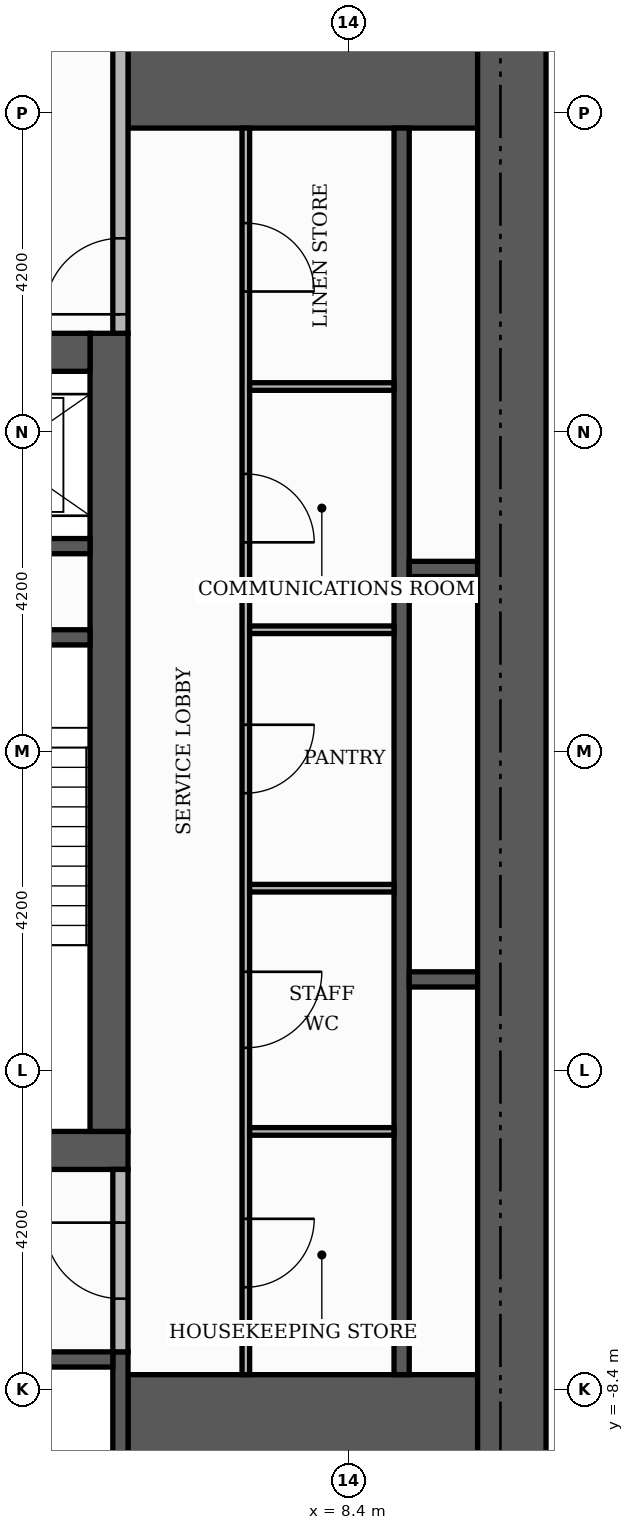
"""IFC4 building model, lengths in metres.
Left out: names, types, materials, properties, quantities, classifications, styles, units other than length and angle.
Written with IfcOpenShell. Run it as: python <this file> out.ifc"""

import sys

from ifc_helpers import new_model, si_unit, direction, frame, frame_2d, origin, place, context, subcontext, project, spatial, rectangle, extrude, element, fill, save


model = new_model("IFC4")
c1 = context("Model", 3, precision=1e-05, world=origin(), true_north=direction((0.0, 1.0)))
c2 = subcontext(c1, "Body", "Model", "MODEL_VIEW")
j1 = project(units=[si_unit("LENGTHUNIT", "METRE"), si_unit("PLANEANGLEUNIT", "RADIAN")], contexts=[c1])
p1 = place(None, origin())
s1 = spatial("IfcSite", under=j1, at=p1, CompositionType="ELEMENT")
p2 = place(p1, origin())
s2 = spatial("IfcBuilding", under=s1, at=p2, CompositionType="ELEMENT")
p3 = place(p2, frame((0.0, 0.0, 38.7)))
s3 = spatial("IfcBuildingStorey", under=s2, at=p3, CompositionType="ELEMENT", Elevation=38.7)
p4 = place(p3, frame((-5.5, -5.25, 0.0), z_axis=(0.0, 0.0, 1.0), x_axis=(1.0, 0.0, 0.0)))
e1 = element("IfcWall", 1, at=p4, inside=s3, PredefinedType="SHEAR", context=c2, shape_type="SweptSolid", body=[
    extrude(rectangle(XDim=11.0, YDim=0.5, at=frame_2d((5.5, 0.0))), origin(), (0.0, 0.0, 1.0), 3.48),
])
p5 = place(p4, frame((4.9, 0.0, 0.0)))
e2 = element("IfcOpeningElement", 2, at=p5, cuts=e1, PredefinedType="OPENING", context=c2, shape_type="SweptSolid", body=[
    extrude(rectangle(XDim=1.2, YDim=2.1, at=frame_2d((0.6, 1.05))), frame((0.0, 0.26, 0.0), z_axis=(0.0, -1.0, 0.0), x_axis=(1.0, 0.0, 0.0)), (0.0, 0.0, 1.0), 0.52),
])
p6 = place(p3, frame((5.25, -5.0, 0.0), z_axis=(0.0, 0.0, 1.0), x_axis=(0.0, 1.0, 0.0)))
e3 = element("IfcWall", 3, at=p6, inside=s3, PredefinedType="SHEAR", context=c2, shape_type="SweptSolid", body=[
    extrude(rectangle(XDim=10.5, YDim=0.5, at=frame_2d((5.25, 0.0))), origin(), (0.0, 0.0, 1.0), 3.48),
])
p7 = place(p3, frame((-5.0, 5.25, 0.0), z_axis=(0.0, 0.0, 1.0), x_axis=(1.0, 0.0, 0.0)))
e4 = element("IfcWall", 4, at=p7, inside=s3, PredefinedType="SHEAR", context=c2, shape_type="SweptSolid", body=[
    extrude(rectangle(XDim=10.0, YDim=0.5, at=frame_2d((5.0, 0.0))), origin(), (0.0, 0.0, 1.0), 3.48),
])
p8 = place(p7, frame((4.4, 0.0, 0.0)))
e5 = element("IfcOpeningElement", 5, at=p8, cuts=e4, PredefinedType="OPENING", context=c2, shape_type="SweptSolid", body=[
    extrude(rectangle(XDim=1.2, YDim=2.1, at=frame_2d((0.6, 1.05))), frame((0.0, 0.26, 0.0), z_axis=(0.0, -1.0, 0.0), x_axis=(1.0, 0.0, 0.0)), (0.0, 0.0, 1.0), 0.52),
])
for number, where, z_axis, x_axis in (
    (6, (5.5, -9.15, 0.0), (0.0, 0.0, 1.0), (1.0, 0.0, 0.0)),
    (7, (5.5, 9.15, 0.0), (0.0, 0.0, 1.0), (1.0, 0.0, 0.0)),
):
    element("IfcWall", number, at=place(p3, frame(where, z_axis=z_axis, x_axis=x_axis)), inside=s3, PredefinedType="SHEAR", context=c2, shape_type="SweptSolid", body=[
        extrude(rectangle(XDim=4.6, YDim=1.9, at=frame_2d((2.3, 0.0))), origin(), (0.0, 0.0, 1.0), 3.48),
    ])
p9 = place(p3, frame((2.15, 1.5, 0.0), z_axis=(0.0, 0.0, 1.0), x_axis=(1.0, 0.0, 0.0)))
e8 = element("IfcWall", 8, at=p9, inside=s3, PredefinedType="SHEAR", context=c2, shape_type="SweptSolid", body=[
    extrude(rectangle(XDim=2.85, YDim=0.2, at=frame_2d((1.425, 0.0))), origin(), (0.0, 0.0, 1.0), 3.48),
])
p10 = place(p3, frame((5.4, -10.1, 0.0), z_axis=(0.0, 0.0, 1.0), x_axis=(0.0, 1.0, 0.0)))
e9 = element("IfcWall", 9, at=p10, inside=s3, PredefinedType="SHEAR", context=c2, shape_type="SweptSolid", body=[
    extrude(rectangle(XDim=2.2, YDim=0.2, at=frame_2d((1.1, 0.0))), origin(), (0.0, 0.0, 1.0), 3.48),
])
p11 = place(p3, frame((9.1, -8.2, 0.0), z_axis=(0.0, 0.0, 1.0), x_axis=(0.0, 1.0, 0.0)))
e10 = element("IfcWall", 10, at=p11, inside=s3, PredefinedType="SHEAR", context=c2, shape_type="SweptSolid", body=[
    extrude(rectangle(XDim=16.4, YDim=0.2, at=frame_2d((8.2, 0.0))), origin(), (0.0, 0.0, 1.0), 3.48),
])
p12 = place(p3, frame((2.8, -8.0, 0.0), z_axis=(0.0, 0.0, 1.0), x_axis=(1.0, 0.0, 0.0)))
e11 = element("IfcWall", 11, at=p12, inside=s3, PredefinedType="SHEAR", context=c2, shape_type="SweptSolid", body=[
    extrude(rectangle(XDim=2.5, YDim=0.2, at=frame_2d((1.25, 0.0))), origin(), (0.0, 0.0, 1.0), 3.48),
])
for number, where, z_axis, x_axis in (
    (12, (9.2, -3.0, 0.0), (0.0, 0.0, 1.0), (1.0, 0.0, 0.0)),
    (13, (9.2, 2.4, 0.0), (0.0, 0.0, 1.0), (1.0, 0.0, 0.0)),
):
    element("IfcWall", number, at=place(p3, frame(where, z_axis=z_axis, x_axis=x_axis)), inside=s3, PredefinedType="SHEAR", context=c2, shape_type="SweptSolid", body=[
        extrude(rectangle(XDim=0.9, YDim=0.2, at=frame_2d((0.45, 0.0))), origin(), (0.0, 0.0, 1.0), 3.48),
    ])
p13 = place(p3, frame((2.15, 2.7, 0.0), z_axis=(0.0, 0.0, 1.0), x_axis=(1.0, 0.0, 0.0)))
e14 = element("IfcWall", 14, at=p13, inside=s3, PredefinedType="SHEAR", context=c2, shape_type="SweptSolid", body=[
    extrude(rectangle(XDim=2.85, YDim=0.2, at=frame_2d((1.425, 0.0))), origin(), (0.0, 0.0, 1.0), 3.48),
])
p14 = place(p3, frame((10.55, -10.1, 0.0), z_axis=(0.0, 0.0, 1.0), x_axis=(0.0, 1.0, 0.0)))
e15 = element("IfcWall", 15, at=p14, inside=s3, PredefinedType="SHEAR", context=c2, shape_type="SweptSolid", body=[
    extrude(rectangle(XDim=20.2, YDim=0.9, at=frame_2d((10.1, 0.0))), origin(), (0.0, 0.0, 1.0), 3.48),
])
p15 = place(p3, frame((7.05, -8.2, 0.0), z_axis=(0.0, 0.0, 1.0), x_axis=(0.0, 1.0, 0.0)))
e16 = element("IfcWall", 16, at=p15, inside=s3, PredefinedType="PARTITIONING", context=c2, shape_type="SweptSolid", body=[
    extrude(rectangle(XDim=16.4, YDim=0.1, at=frame_2d((8.2, 0.0))), origin(), (0.0, 0.0, 1.0), 3.48),
])
p16 = place(p15, frame((1.15, 0.0, 0.0)))
e17 = element("IfcOpeningElement", 17, at=p16, cuts=e16, PredefinedType="OPENING", context=c2, shape_type="SweptSolid", body=[
    extrude(rectangle(XDim=0.9, YDim=2.1, at=frame_2d((0.45, 1.05))), frame((0.0, 0.06, 0.0), z_axis=(0.0, -1.0, 0.0), x_axis=(1.0, 0.0, 0.0)), (0.0, 0.0, 1.0), 0.12),
])
p17 = place(p15, frame((4.3, 0.0, 0.0)))
e18 = element("IfcOpeningElement", 18, at=p17, cuts=e16, PredefinedType="OPENING", context=c2, shape_type="SweptSolid", body=[
    extrude(rectangle(XDim=1.0, YDim=2.1, at=frame_2d((0.5, 1.05))), frame((0.0, 0.06, 0.0), z_axis=(0.0, -1.0, 0.0), x_axis=(1.0, 0.0, 0.0)), (0.0, 0.0, 1.0), 0.12),
])
p18 = place(p15, frame((7.65, 0.0, 0.0)))
e19 = element("IfcOpeningElement", 19, at=p18, cuts=e16, PredefinedType="OPENING", context=c2, shape_type="SweptSolid", body=[
    extrude(rectangle(XDim=0.9, YDim=2.1, at=frame_2d((0.45, 1.05))), frame((0.0, 0.06, 0.0), z_axis=(0.0, -1.0, 0.0), x_axis=(1.0, 0.0, 0.0)), (0.0, 0.0, 1.0), 0.12),
])
p19 = place(p15, frame((10.95, 0.0, 0.0)))
e20 = element("IfcOpeningElement", 20, at=p19, cuts=e16, PredefinedType="OPENING", context=c2, shape_type="SweptSolid", body=[
    extrude(rectangle(XDim=0.9, YDim=2.1, at=frame_2d((0.45, 1.05))), frame((0.0, 0.06, 0.0), z_axis=(0.0, -1.0, 0.0), x_axis=(1.0, 0.0, 0.0)), (0.0, 0.0, 1.0), 0.12),
])
p20 = place(p15, frame((14.25, 0.0, 0.0)))
e21 = element("IfcOpeningElement", 21, at=p20, cuts=e16, PredefinedType="OPENING", context=c2, shape_type="SweptSolid", body=[
    extrude(rectangle(XDim=0.9, YDim=2.1, at=frame_2d((0.45, 1.05))), frame((0.0, 0.06, 0.0), z_axis=(0.0, -1.0, 0.0), x_axis=(1.0, 0.0, 0.0)), (0.0, 0.0, 1.0), 0.12),
])
p21 = place(p3, frame((5.4, -7.9, 0.0), z_axis=(0.0, 0.0, 1.0), x_axis=(0.0, 1.0, 0.0)))
e22 = element("IfcWall", 22, at=p21, inside=s3, PredefinedType="PARTITIONING", context=c2, shape_type="SweptSolid", body=[
    extrude(rectangle(XDim=2.4, YDim=0.2, at=frame_2d((1.2, 0.0))), origin(), (0.0, 0.0, 1.0), 3.48),
])
p22 = place(p21, frame((0.7, 0.0, 0.0)))
e23 = element("IfcOpeningElement", 23, at=p22, cuts=e22, PredefinedType="OPENING", context=c2, shape_type="SweptSolid", body=[
    extrude(rectangle(XDim=1.0, YDim=2.1, at=frame_2d((0.5, 1.05))), frame((0.0, 0.11, 0.0), z_axis=(0.0, -1.0, 0.0), x_axis=(1.0, 0.0, 0.0)), (0.0, 0.0, 1.0), 0.22),
])
for number, where, z_axis, x_axis in (
    (24, (7.1, -5.0, 0.0), (0.0, 0.0, 1.0), (1.0, 0.0, 0.0)),
    (25, (7.1, -1.8, 0.0), (0.0, 0.0, 1.0), (1.0, 0.0, 0.0)),
    (26, (7.1, 1.6, 0.0), (0.0, 0.0, 1.0), (1.0, 0.0, 0.0)),
    (27, (7.1, 4.8, 0.0), (0.0, 0.0, 1.0), (1.0, 0.0, 0.0)),
):
    element("IfcWall", number, at=place(p3, frame(where, z_axis=z_axis, x_axis=x_axis)), inside=s3, PredefinedType="PARTITIONING", context=c2, shape_type="SweptSolid", body=[
        extrude(rectangle(XDim=1.9, YDim=0.1, at=frame_2d((0.95, 0.0))), origin(), (0.0, 0.0, 1.0), 3.48),
    ])
p23 = place(p3, frame((5.4, 5.5, 0.0), z_axis=(0.0, 0.0, 1.0), x_axis=(0.0, 1.0, 0.0)))
e28 = element("IfcWall", 28, at=p23, inside=s3, PredefinedType="PARTITIONING", context=c2, shape_type="SweptSolid", body=[
    extrude(rectangle(XDim=4.6, YDim=0.2, at=frame_2d((2.3, 0.0))), origin(), (0.0, 0.0, 1.0), 3.48),
])
p24 = place(p23, frame((0.25, 0.0, 0.0)))
e29 = element("IfcOpeningElement", 29, at=p24, cuts=e28, PredefinedType="OPENING", context=c2, shape_type="SweptSolid", body=[
    extrude(rectangle(XDim=1.0, YDim=2.1, at=frame_2d((0.5, 1.05))), frame((0.0, 0.11, 0.0), z_axis=(0.0, -1.0, 0.0), x_axis=(1.0, 0.0, 0.0)), (0.0, 0.0, 1.0), 0.22),
])
p25 = place(p24, origin())
e30 = element("IfcDoor", 30, at=p25, inside=s3, OperationType="SINGLE_SWING_LEFT", PredefinedType="DOOR", context=c2, shape_type="SweptSolid", body=[
    extrude(rectangle(XDim=1.0, YDim=2.1, at=frame_2d((0.5, 1.05))), frame((0.0, 0.025, 0.0), z_axis=(0.0, -1.0, 0.0), x_axis=(1.0, 0.0, 0.0)), (0.0, 0.0, 1.0), 0.05),
])
fill(e29, e30)
p26 = place(p22, origin())
e31 = element("IfcDoor", 31, at=p26, inside=s3, OperationType="SINGLE_SWING_RIGHT", PredefinedType="DOOR", context=c2, shape_type="SweptSolid", body=[
    extrude(rectangle(XDim=1.0, YDim=2.1, at=frame_2d((0.5, 1.05))), frame((0.0, 0.025, 0.0), z_axis=(0.0, -1.0, 0.0), x_axis=(1.0, 0.0, 0.0)), (0.0, 0.0, 1.0), 0.05),
])
fill(e23, e31)
p27 = place(p16, frame((0.9, 0.0, 0.0), z_axis=(0.0, 0.0, 1.0), x_axis=(-1.0, 0.0, 0.0)))
e32 = element("IfcDoor", 32, at=p27, inside=s3, OperationType="SINGLE_SWING_RIGHT", PredefinedType="DOOR", context=c2, shape_type="SweptSolid", body=[
    extrude(rectangle(XDim=0.9, YDim=2.1, at=frame_2d((0.45, 1.05))), frame((0.0, 0.025, 0.0), z_axis=(0.0, -1.0, 0.0), x_axis=(1.0, 0.0, 0.0)), (0.0, 0.0, 1.0), 0.05),
])
fill(e17, e32)
p28 = place(p17, frame((1.0, 0.0, 0.0), z_axis=(0.0, 0.0, 1.0), x_axis=(-1.0, 0.0, 0.0)))
e33 = element("IfcDoor", 33, at=p28, inside=s3, OperationType="SINGLE_SWING_RIGHT", PredefinedType="DOOR", context=c2, shape_type="SweptSolid", body=[
    extrude(rectangle(XDim=1.0, YDim=2.1, at=frame_2d((0.5, 1.05))), frame((0.0, 0.025, 0.0), z_axis=(0.0, -1.0, 0.0), x_axis=(1.0, 0.0, 0.0)), (0.0, 0.0, 1.0), 0.05),
])
fill(e18, e33)
p29 = place(p18, frame((0.9, 0.0, 0.0), z_axis=(0.0, 0.0, 1.0), x_axis=(-1.0, 0.0, 0.0)))
e34 = element("IfcDoor", 34, at=p29, inside=s3, OperationType="SINGLE_SWING_RIGHT", PredefinedType="DOOR", context=c2, shape_type="SweptSolid", body=[
    extrude(rectangle(XDim=0.9, YDim=2.1, at=frame_2d((0.45, 1.05))), frame((0.0, 0.025, 0.0), z_axis=(0.0, -1.0, 0.0), x_axis=(1.0, 0.0, 0.0)), (0.0, 0.0, 1.0), 0.05),
])
fill(e19, e34)
p30 = place(p19, frame((0.9, 0.0, 0.0), z_axis=(0.0, 0.0, 1.0), x_axis=(-1.0, 0.0, 0.0)))
e35 = element("IfcDoor", 35, at=p30, inside=s3, OperationType="SINGLE_SWING_LEFT", PredefinedType="DOOR", context=c2, shape_type="SweptSolid", body=[
    extrude(rectangle(XDim=0.9, YDim=2.1, at=frame_2d((0.45, 1.05))), frame((0.0, 0.025, 0.0), z_axis=(0.0, -1.0, 0.0), x_axis=(1.0, 0.0, 0.0)), (0.0, 0.0, 1.0), 0.05),
])
fill(e20, e35)
p31 = place(p20, frame((0.9, 0.0, 0.0), z_axis=(0.0, 0.0, 1.0), x_axis=(-1.0, 0.0, 0.0)))
e36 = element("IfcDoor", 36, at=p31, inside=s3, OperationType="SINGLE_SWING_LEFT", PredefinedType="DOOR", context=c2, shape_type="SweptSolid", body=[
    extrude(rectangle(XDim=0.9, YDim=2.1, at=frame_2d((0.45, 1.05))), frame((0.0, 0.025, 0.0), z_axis=(0.0, -1.0, 0.0), x_axis=(1.0, 0.0, 0.0)), (0.0, 0.0, 1.0), 0.05),
])
fill(e21, e36)
save(model, sys.argv[1])
